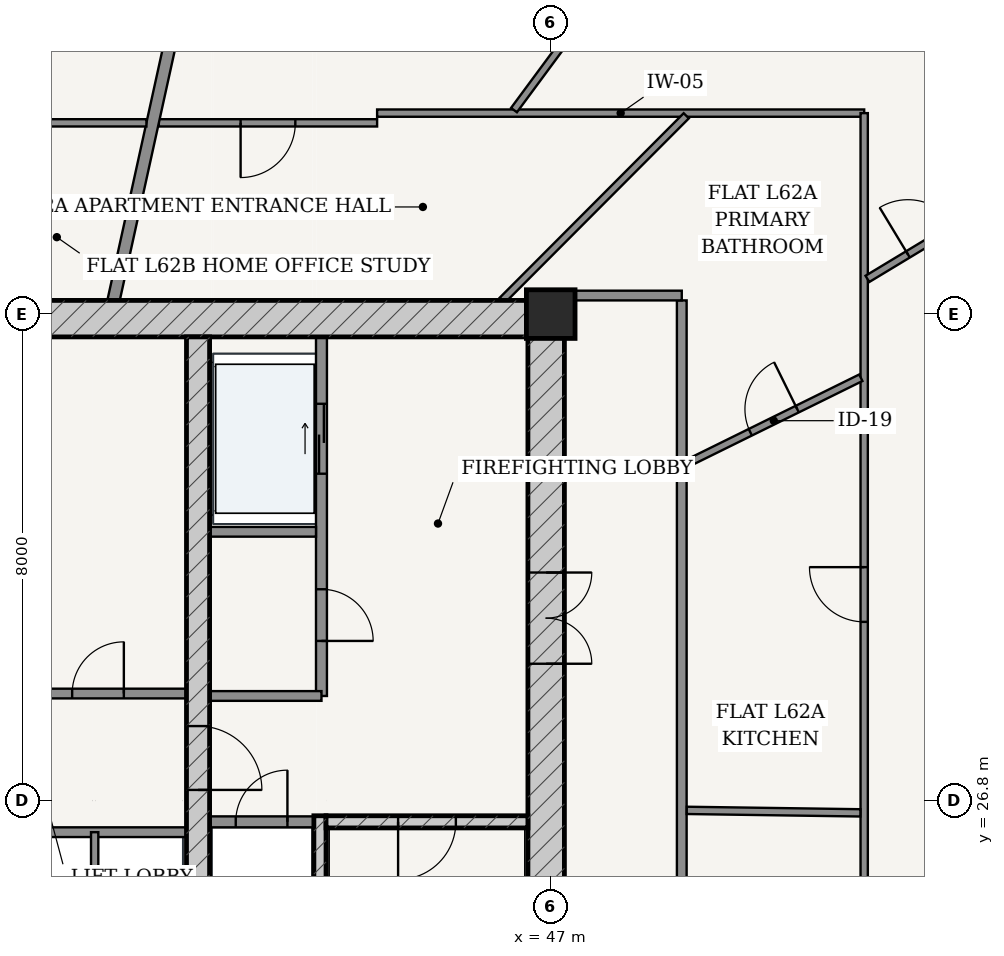
"""IFC4 building model, lengths in metres.
Left out: names, types, materials, properties, quantities, classifications, styles, units other than length and angle.
Written with IfcOpenShell. Run it as: python <this file> out.ifc"""

import sys

from ifc_helpers import new_model, si_unit, direction, frame, frame_2d, origin, origin_2d, place, context, subcontext, project, spatial, rectangle, extrude, source, transform, mapped, element, fill, save


model = new_model("IFC4")
c1 = context("Model", 3, precision=1e-05, world=origin(), true_north=direction((-0.2419218956, 0.970295726276)))
c2 = subcontext(c1, "Body", "Model", "MODEL_VIEW")
j1 = project(units=[si_unit("LENGTHUNIT", "METRE"), si_unit("PLANEANGLEUNIT", "RADIAN")], contexts=[c1])
p1 = place(None, origin())
s1 = spatial("IfcSite", under=j1, at=p1, CompositionType="ELEMENT")
p2 = place(p1, origin())
s2 = spatial("IfcBuilding", under=s1, at=p2, CompositionType="ELEMENT")
p3 = place(p2, frame((0.0, 0.0, 235.6)))
s3 = spatial("IfcBuildingStorey", under=s2, at=p3, CompositionType="ELEMENT", Elevation=235.6)
p4 = place(p3, frame((47.0, 34.8, 0.0), z_axis=(0.0, 0.0, 1.0), x_axis=(1.0, 0.0, 0.0)))
e1 = element("IfcColumn", 1, at=p4, inside=s3, PredefinedType="COLUMN", context=c2, shape_type="SweptSolid", body=[
    extrude(rectangle(XDim=0.8, YDim=0.8, at=origin_2d()), origin(), (0.0, 0.0, 1.0), 3.7),
])
p5 = place(p3, frame((28.775, 34.725, 0.0), z_axis=(0.0, 0.0, 1.0), x_axis=(1.0, 0.0, 0.0)))
e2 = element("IfcWall", 2, at=p5, inside=s3, PredefinedType="SHEAR", context=c2, shape_type="SweptSolid", body=[
    extrude(rectangle(XDim=18.45, YDim=0.6, at=frame_2d((9.225, 0.0))), origin(), (0.0, 0.0, 1.0), 3.435),
])
p6 = place(p3, frame((46.925, 19.175, 0.0), z_axis=(0.0, 0.0, 1.0), x_axis=(0.0, 1.0, 0.0)))
e3 = element("IfcWall", 3, at=p6, inside=s3, PredefinedType="SHEAR", context=c2, shape_type="SweptSolid", body=[
    extrude(rectangle(XDim=15.25, YDim=0.6, at=frame_2d((7.625, 0.0))), origin(), (0.0, 0.0, 1.0), 3.435),
])
p7 = place(p6, frame((9.875, 0.0, 0.0)))
e4 = element("IfcOpeningElement", 4, at=p7, cuts=e3, PredefinedType="OPENING", context=c2, shape_type="SweptSolid", body=[
    extrude(rectangle(XDim=1.5, YDim=2.2, at=frame_2d((0.75, 1.1))), frame((0.0, 0.31, 0.0), z_axis=(0.0, -1.0, 0.0), x_axis=(1.0, 0.0, 0.0)), (0.0, 0.0, 1.0), 0.62),
])
p8 = place(p3, frame((43.205, 19.175, 0.0), z_axis=(0.0, 0.0, 1.0), x_axis=(0.0, 1.0, 0.0)))
e5 = element("IfcWall", 5, at=p8, inside=s3, PredefinedType="SOLIDWALL", context=c2, shape_type="SweptSolid", body=[
    extrude(rectangle(XDim=7.375, YDim=0.2, at=frame_2d((3.688, 0.0))), origin(), (0.0, 0.0, 1.0), 3.435),
])
p9 = place(p3, frame((43.305, 26.45, 0.0), z_axis=(0.0, 0.0, 1.0), x_axis=(1.0, 0.0, 0.0)))
e6 = element("IfcWall", 6, at=p9, inside=s3, PredefinedType="SOLIDWALL", context=c2, shape_type="SweptSolid", body=[
    extrude(rectangle(XDim=3.32, YDim=0.2, at=frame_2d((1.66, 0.0))), origin(), (0.0, 0.0, 1.0), 3.435),
])
p10 = place(p9, frame((1.185, 0.0, 0.0)))
e7 = element("IfcOpeningElement", 7, at=p10, cuts=e6, PredefinedType="OPENING", context=c2, shape_type="SweptSolid", body=[
    extrude(rectangle(XDim=0.95, YDim=2.15, at=frame_2d((0.475, 1.075))), frame((0.0, 0.11, 0.0), z_axis=(0.0, -1.0, 0.0), x_axis=(1.0, 0.0, 0.0)), (0.0, 0.0, 1.0), 0.22),
])
p11 = place(p3, frame((41.2, 19.175, 0.0), z_axis=(0.0, 0.0, 1.0), x_axis=(0.0, 1.0, 0.0)))
e8 = element("IfcWall", 8, at=p11, inside=s3, PredefinedType="SHEAR", context=c2, shape_type="SweptSolid", body=[
    extrude(rectangle(XDim=15.25, YDim=0.38, at=frame_2d((7.625, 0.0))), origin(), (0.0, 0.0, 1.0), 3.435),
])
p12 = place(p11, frame((7.8, 0.0, 0.0)))
e9 = element("IfcOpeningElement", 9, at=p12, cuts=e8, PredefinedType="OPENING", context=c2, shape_type="SweptSolid", body=[
    extrude(rectangle(XDim=1.05, YDim=2.15, at=frame_2d((0.525, 1.075))), frame((0.0, 0.2, 0.0), z_axis=(0.0, -1.0, 0.0), x_axis=(1.0, 0.0, 0.0)), (0.0, 0.0, 1.0), 0.4),
])
p13 = place(p3, frame((41.39, 26.45, 0.0), z_axis=(0.0, 0.0, 1.0), x_axis=(1.0, 0.0, 0.0)))
e10 = element("IfcWall", 10, at=p13, inside=s3, PredefinedType="PARTITIONING", context=c2, shape_type="SweptSolid", body=[
    extrude(rectangle(XDim=1.71, YDim=0.18, at=frame_2d((0.855, 0.0))), origin(), (0.0, 0.0, 1.0), 3.435),
])
p14 = place(p13, frame((0.43, 0.0, 0.0)))
e11 = element("IfcOpeningElement", 11, at=p14, cuts=e10, PredefinedType="OPENING", context=c2, shape_type="SweptSolid", body=[
    extrude(rectangle(XDim=0.85, YDim=2.1, at=frame_2d((0.425, 1.05))), frame((0.0, 0.1, 0.0), z_axis=(0.0, -1.0, 0.0), x_axis=(1.0, 0.0, 0.0)), (0.0, 0.0, 1.0), 0.2),
])
p15 = place(p3, frame((43.23, 28.52, 0.0), z_axis=(0.0, 0.0, 1.0), x_axis=(0.0, 1.0, 0.0)))
e12 = element("IfcWall", 12, at=p15, inside=s3, PredefinedType="PARTITIONING", context=c2, shape_type="SweptSolid", body=[
    extrude(rectangle(XDim=5.905, YDim=0.18, at=frame_2d((2.953, 0.0))), origin(), (0.0, 0.0, 1.0), 3.435),
])
p16 = place(p15, frame((0.905, 0.0, 0.0)))
e13 = element("IfcOpeningElement", 13, at=p16, cuts=e12, PredefinedType="OPENING", context=c2, shape_type="SweptSolid", body=[
    extrude(rectangle(XDim=0.85, YDim=2.1, at=frame_2d((0.425, 1.05))), frame((0.0, 0.1, 0.0), z_axis=(0.0, -1.0, 0.0), x_axis=(1.0, 0.0, 0.0)), (0.0, 0.0, 1.0), 0.2),
])
p17 = place(p15, frame((3.655, 0.0, 0.0)))
e14 = element("IfcOpeningElement", 14, at=p17, cuts=e12, PredefinedType="OPENING", context=c2, shape_type="SweptSolid", body=[
    extrude(rectangle(XDim=1.15, YDim=2.2, at=frame_2d((0.575, 1.1))), frame((0.0, 0.1, 0.0), z_axis=(0.0, -1.0, 0.0), x_axis=(1.0, 0.0, 0.0)), (0.0, 0.0, 1.0), 0.2),
])
p18 = place(p3, frame((41.39, 31.22, 0.0), z_axis=(0.0, 0.0, 1.0), x_axis=(1.0, 0.0, 0.0)))
e15 = element("IfcWall", 15, at=p18, inside=s3, PredefinedType="PARTITIONING", context=c2, shape_type="SweptSolid", body=[
    extrude(rectangle(XDim=1.75, YDim=0.16, at=frame_2d((0.875, 0.0))), origin(), (0.0, 0.0, 1.0), 3.435),
])
p19 = place(p3, frame((41.39, 28.52, 0.0), z_axis=(0.0, 0.0, 1.0), x_axis=(1.0, 0.0, 0.0)))
e16 = element("IfcWall", 16, at=p19, inside=s3, PredefinedType="PARTITIONING", context=c2, shape_type="SweptSolid", body=[
    extrude(rectangle(XDim=1.84, YDim=0.16, at=frame_2d((0.92, 0.0))), origin(), (0.0, 0.0, 1.0), 3.435),
])
p20 = place(p3, frame((34.99, 28.56, 0.0), z_axis=(0.0, 0.0, 1.0), x_axis=(1.0, 0.0, 0.0)))
e17 = element("IfcWall", 17, at=p20, inside=s3, PredefinedType="PARTITIONING", context=c2, shape_type="SweptSolid", body=[
    extrude(rectangle(XDim=6.02, YDim=0.16, at=frame_2d((3.01, 0.0))), origin(), (0.0, 0.0, 1.0), 3.435),
])
p21 = place(p20, frame((1.025, 0.0, 0.0)))
e18 = element("IfcOpeningElement", 18, at=p21, cuts=e17, PredefinedType="OPENING", context=c2, shape_type="SweptSolid", body=[
    extrude(rectangle(XDim=0.86, YDim=2.1, at=frame_2d((0.43, 1.05))), frame((0.0, 0.09, 0.0), z_axis=(0.0, -1.0, 0.0), x_axis=(1.0, 0.0, 0.0)), (0.0, 0.0, 1.0), 0.18),
])
p22 = place(p20, frame((4.14, 0.0, 0.0)))
e19 = element("IfcOpeningElement", 19, at=p22, cuts=e17, PredefinedType="OPENING", context=c2, shape_type="SweptSolid", body=[
    extrude(rectangle(XDim=0.85, YDim=2.1, at=frame_2d((0.425, 1.05))), frame((0.0, 0.09, 0.0), z_axis=(0.0, -1.0, 0.0), x_axis=(1.0, 0.0, 0.0)), (0.0, 0.0, 1.0), 0.18),
])
p23 = place(p3, frame((34.99, 26.28, 0.0), z_axis=(0.0, 0.0, 1.0), x_axis=(1.0, 0.0, 0.0)))
e20 = element("IfcWall", 20, at=p23, inside=s3, PredefinedType="PARTITIONING", context=c2, shape_type="SweptSolid", body=[
    extrude(rectangle(XDim=6.02, YDim=0.16, at=frame_2d((3.01, 0.0))), origin(), (0.0, 0.0, 1.0), 3.435),
])
p24 = place(p23, frame((0.225, 0.0, 0.0)))
e21 = element("IfcOpeningElement", 21, at=p24, cuts=e20, PredefinedType="OPENING", context=c2, shape_type="SweptSolid", body=[
    extrude(rectangle(XDim=1.1, YDim=2.2, at=frame_2d((0.55, 1.1))), frame((0.0, 0.09, 0.0), z_axis=(0.0, -1.0, 0.0), x_axis=(1.0, 0.0, 0.0)), (0.0, 0.0, 1.0), 0.18),
])
p25 = place(p23, frame((1.705, 0.0, 0.0)))
e22 = element("IfcOpeningElement", 22, at=p25, cuts=e20, PredefinedType="OPENING", context=c2, shape_type="SweptSolid", body=[
    extrude(rectangle(XDim=1.1, YDim=2.2, at=frame_2d((0.55, 1.1))), frame((0.0, 0.09, 0.0), z_axis=(0.0, -1.0, 0.0), x_axis=(1.0, 0.0, 0.0)), (0.0, 0.0, 1.0), 0.18),
])
p26 = place(p3, frame((39.5, 23.72, 0.0), z_axis=(0.0, 0.0, 1.0), x_axis=(0.0, 1.0, 0.0)))
e23 = element("IfcWall", 23, at=p26, inside=s3, PredefinedType="PARTITIONING", context=c2, shape_type="SweptSolid", body=[
    extrude(rectangle(XDim=2.56, YDim=0.12, at=frame_2d((1.28, 0.0))), origin(), (0.0, 0.0, 1.0), 3.435),
])
p27 = place(p3, frame((49.155, 16.725, 0.0), z_axis=(0.0, 0.0, 1.0), x_axis=(0.0, 1.0, 0.0)))
e24 = element("IfcWall", 24, at=p27, inside=s3, PredefinedType="PARTITIONING", context=c2, shape_type="SweptSolid", body=[
    extrude(rectangle(XDim=18.3, YDim=0.16, at=frame_2d((9.15, 0.0))), origin(), (0.0, 0.0, 1.0), 2.951),
])
p28 = place(p27, frame((7.401, 0.0, 0.0)))
e25 = element("IfcOpeningElement", 25, at=p28, cuts=e24, PredefinedType="OPENING", context=c2, shape_type="SweptSolid", body=[
    extrude(rectangle(XDim=0.98, YDim=2.2, at=frame_2d((0.49, 1.1))), frame((0.0, 0.09, 0.0), z_axis=(0.0, -1.0, 0.0), x_axis=(1.0, 0.0, 0.0)), (0.0, 0.0, 1.0), 0.18),
])
p29 = place(p3, frame((47.225, 35.105, 0.0), z_axis=(0.0, 0.0, 1.0), x_axis=(1.0, 0.0, 0.0)))
e26 = element("IfcWall", 26, at=p29, inside=s3, PredefinedType="PARTITIONING", context=c2, shape_type="SweptSolid", body=[
    extrude(rectangle(XDim=1.93, YDim=0.16, at=frame_2d((0.965, 0.0))), origin(), (0.0, 0.0, 1.0), 3.435),
])
p30 = place(p3, frame((40.555, 37.945, 0.0), z_axis=(0.0, 0.0, 1.0), x_axis=(1.0, 0.0, 0.0)))
e27 = element("IfcWall", 27, at=p30, inside=s3, PredefinedType="PARTITIONING", context=c2, shape_type="SweptSolid", body=[
    extrude(rectangle(XDim=3.59, YDim=0.12, at=frame_2d((1.795, 0.0))), origin(), (0.0, 0.0, 1.0), 2.951),
])
p31 = place(p30, frame((1.345, 0.0, 0.0)))
e28 = element("IfcOpeningElement", 28, at=p31, cuts=e27, PredefinedType="OPENING", context=c2, shape_type="SweptSolid", body=[
    extrude(rectangle(XDim=0.9, YDim=2.15, at=frame_2d((0.45, 1.075))), frame((0.0, 0.07, 0.0), z_axis=(0.0, -1.0, 0.0), x_axis=(1.0, 0.0, 0.0)), (0.0, 0.0, 1.0), 0.14),
])
p32 = place(p3, frame((44.145, 38.105, 0.0), z_axis=(0.0, 0.0, 1.0), x_axis=(1.0, 0.0, 0.0)))
e29 = element("IfcWall", 29, at=p32, inside=s3, PredefinedType="PARTITIONING", context=c2, shape_type="SweptSolid", body=[
    extrude(rectangle(XDim=8.01, YDim=0.12, at=frame_2d((4.005, 0.0))), origin(), (0.0, 0.0, 1.0), 2.951),
])
p33 = place(p3, frame((52.155, 38.105, 0.0), z_axis=(0.0, 0.0, 1.0), x_axis=(0.0, -1.0, 0.0)))
e30 = element("IfcWall", 30, at=p33, inside=s3, PredefinedType="PARTITIONING", context=c2, shape_type="SweptSolid", body=[
    extrude(rectangle(XDim=16.501, YDim=0.12, at=frame_2d((8.251, 0.0))), origin(), (0.0, 0.0, 1.0), 2.951),
])
p34 = place(p33, frame((13.395, 0.0, 0.0)))
e31 = element("IfcOpeningElement", 31, at=p34, cuts=e30, PredefinedType="OPENING", context=c2, shape_type="SweptSolid", body=[
    extrude(rectangle(XDim=0.9, YDim=2.15, at=frame_2d((0.45, 1.075))), frame((0.0, 0.07, 0.0), z_axis=(0.0, -1.0, 0.0), x_axis=(1.0, 0.0, 0.0)), (0.0, 0.0, 1.0), 0.14),
])
p35 = place(p33, frame((7.467, 0.0, 0.0)))
e32 = element("IfcOpeningElement", 32, at=p35, cuts=e30, PredefinedType="OPENING", context=c2, shape_type="SweptSolid", body=[
    extrude(rectangle(XDim=0.9, YDim=2.15, at=frame_2d((0.45, 1.075))), frame((0.0, 0.07, 0.0), z_axis=(0.0, -1.0, 0.0), x_axis=(1.0, 0.0, 0.0)), (0.0, 0.0, 1.0), 0.14),
])
p36 = place(p3, frame((52.208, 35.379, 0.0), z_axis=(0.0, 0.0, 1.0), x_axis=(0.856039372964, 0.516910622774, 0.0)))
e33 = element("IfcWall", 33, at=p36, inside=s3, PredefinedType="PARTITIONING", context=c2, shape_type="SweptSolid", body=[
    extrude(rectangle(XDim=4.471, YDim=0.12, at=frame_2d((2.236, 0.0))), origin(), (0.0, 0.0, 1.0), 2.951),
])
p37 = place(p36, frame((0.779, 0.0, 0.0)))
e34 = element("IfcOpeningElement", 34, at=p37, cuts=e33, PredefinedType="OPENING", context=c2, shape_type="SweptSolid", body=[
    extrude(rectangle(XDim=0.9, YDim=2.15, at=frame_2d((0.45, 1.075))), frame((0.0, 0.07, 0.0), z_axis=(0.0, -1.0, 0.0), x_axis=(1.0, 0.0, 0.0)), (0.0, 0.0, 1.0), 0.14),
])
p38 = place(p3, frame((46.396, 38.155, 0.0), z_axis=(0.0, 0.0, 1.0), x_axis=(0.594526205526, 0.804076234535, 0.0)))
e35 = element("IfcWall", 35, at=p38, inside=s3, PredefinedType="PARTITIONING", context=c2, shape_type="SweptSolid", body=[
    extrude(rectangle(XDim=6.146, YDim=0.12, at=frame_2d((3.073, 0.0))), origin(), (0.0, 0.0, 1.0), 2.951),
])
p39 = place(p38, frame((1.615, 0.0, 0.0)))
e36 = element("IfcOpeningElement", 36, at=p39, cuts=e35, PredefinedType="OPENING", context=c2, shape_type="SweptSolid", body=[
    extrude(rectangle(XDim=0.9, YDim=2.15, at=frame_2d((0.45, 1.075))), frame((0.0, 0.07, 0.0), z_axis=(0.0, -1.0, 0.0), x_axis=(1.0, 0.0, 0.0)), (0.0, 0.0, 1.0), 0.14),
])
p40 = place(p3, frame((49.237, 26.639, 0.0), z_axis=(0.0, 0.0, 1.0), x_axis=(0.999896890624, -0.014359948506, 0.0)))
e37 = element("IfcWall", 37, at=p40, inside=s3, PredefinedType="PARTITIONING", context=c2, shape_type="SweptSolid", body=[
    extrude(rectangle(XDim=2.856, YDim=0.12, at=frame_2d((1.428, 0.0))), origin(), (0.0, 0.0, 1.0), 3.435),
])
p41 = place(p3, frame((49.237, 32.341, 0.0), z_axis=(0.0, 0.0, 1.0), x_axis=(0.896876689717, 0.442280684004, 0.0)))
e38 = element("IfcWall", 38, at=p41, inside=s3, PredefinedType="PARTITIONING", context=c2, shape_type="SweptSolid", body=[
    extrude(rectangle(XDim=3.192, YDim=0.12, at=frame_2d((1.596, 0.0))), origin(), (0.0, 0.0, 1.0), 3.11),
])
p42 = place(p41, frame((1.166, 0.0, 0.0)))
e39 = element("IfcOpeningElement", 39, at=p42, cuts=e38, PredefinedType="OPENING", context=c2, shape_type="SweptSolid", body=[
    extrude(rectangle(XDim=0.86, YDim=2.15, at=frame_2d((0.43, 1.075))), frame((0.0, 0.07, 0.0), z_axis=(0.0, -1.0, 0.0), x_axis=(1.0, 0.0, 0.0)), (0.0, 0.0, 1.0), 0.14),
])
p43 = place(p3, frame((46.203, 35.026, 0.0), z_axis=(0.0, 0.0, 1.0), x_axis=(0.706080585752, 0.708131489502, 0.0)))
e40 = element("IfcWall", 40, at=p43, inside=s3, PredefinedType="PARTITIONING", context=c2, shape_type="SweptSolid", body=[
    extrude(rectangle(XDim=4.285, YDim=0.12, at=frame_2d((2.143, 0.0))), origin(), (0.0, 0.0, 1.0), 2.951),
])
p44 = place(p3, frame((39.811, 35.027, 0.0), z_axis=(0.0, 0.0, 1.0), x_axis=(0.214966857327, 0.976621344356, 0.0)))
e41 = element("IfcWall", 41, at=p44, inside=s3, PredefinedType="PARTITIONING", context=c2, shape_type="SweptSolid", body=[
    extrude(rectangle(XDim=11.258, YDim=0.2, at=frame_2d((5.629, 0.0))), origin(), (0.0, 0.0, 1.0), 2.52),
])
p45 = place(p3, frame((31.855, 37.945, 0.0), z_axis=(0.0, 0.0, 1.0), x_axis=(1.0, 0.0, 0.0)))
e42 = element("IfcWall", 42, at=p45, inside=s3, PredefinedType="PARTITIONING", context=c2, shape_type="SweptSolid", body=[
    extrude(rectangle(XDim=8.496, YDim=0.12, at=frame_2d((4.248, 0.0))), origin(), (0.0, 0.0, 1.0), 2.951),
])
p46 = place(p45, frame((5.625, 0.0, 0.0)))
e43 = element("IfcOpeningElement", 43, at=p46, cuts=e42, PredefinedType="OPENING", context=c2, shape_type="SweptSolid", body=[
    extrude(rectangle(XDim=0.9, YDim=2.15, at=frame_2d((0.45, 1.075))), frame((0.0, 0.07, 0.0), z_axis=(0.0, -1.0, 0.0), x_axis=(1.0, 0.0, 0.0)), (0.0, 0.0, 1.0), 0.14),
])
m1 = source(origin(), c2, "Body", "SweptSolid", [
    extrude(rectangle(XDim=1.5, YDim=2.2, at=frame_2d((0.75, 1.1))), frame((0.0, 0.025, 0.0), z_axis=(0.0, -1.0, 0.0), x_axis=(1.0, 0.0, 0.0)), (0.0, 0.0, 1.0), 0.05),
])
p47 = place(p7, frame((1.5, 0.0, 0.0), z_axis=(0.0, 0.0, 1.0), x_axis=(-1.0, 0.0, 0.0)))
e44 = element("IfcDoor", 44, at=p47, inside=s3, OperationType="DOUBLE_DOOR_SINGLE_SWING", PredefinedType="DOOR", context=c2, shape_type="MappedRepresentation", body=[
    mapped(m1, transform((0.0, 0.0, 0.0), scale=1.0)),
])
fill(e4, e44)
m2 = source(origin(), c2, "Body", "SweptSolid", [
    extrude(rectangle(XDim=1.05, YDim=2.15, at=frame_2d((0.525, 1.075))), frame((0.0, 0.025, 0.0), z_axis=(0.0, -1.0, 0.0), x_axis=(1.0, 0.0, 0.0)), (0.0, 0.0, 1.0), 0.05),
])
p48 = place(p12, frame((1.05, 0.0, 0.0), z_axis=(0.0, 0.0, 1.0), x_axis=(-1.0, 0.0, 0.0)))
e45 = element("IfcDoor", 45, at=p48, inside=s3, OperationType="SINGLE_SWING_RIGHT", PredefinedType="DOOR", context=c2, shape_type="MappedRepresentation", body=[
    mapped(m2, transform((0.0, 0.0, 0.0), scale=1.0)),
])
fill(e9, e45)
m3 = source(origin(), c2, "Body", "SweptSolid", [
    extrude(rectangle(XDim=0.95, YDim=2.15, at=frame_2d((0.475, 1.075))), frame((0.0, 0.025, 0.0), z_axis=(0.0, -1.0, 0.0), x_axis=(1.0, 0.0, 0.0)), (0.0, 0.0, 1.0), 0.05),
])
p49 = place(p10, frame((0.95, 0.0, 0.0), z_axis=(0.0, 0.0, 1.0), x_axis=(-1.0, 0.0, 0.0)))
e46 = element("IfcDoor", 46, at=p49, inside=s3, OperationType="SINGLE_SWING_RIGHT", PredefinedType="DOOR", context=c2, shape_type="MappedRepresentation", body=[
    mapped(m3, transform((0.0, 0.0, 0.0), scale=1.0)),
])
fill(e7, e46)
m4 = source(origin(), c2, "Body", "SweptSolid", [
    extrude(rectangle(XDim=0.85, YDim=2.1, at=frame_2d((0.425, 1.05))), frame((0.0, 0.025, 0.0), z_axis=(0.0, -1.0, 0.0), x_axis=(1.0, 0.0, 0.0)), (0.0, 0.0, 1.0), 0.05),
])
p50 = place(p14, origin())
e47 = element("IfcDoor", 47, at=p50, inside=s3, OperationType="SINGLE_SWING_RIGHT", PredefinedType="DOOR", context=c2, shape_type="MappedRepresentation", body=[
    mapped(m4, transform((0.0, 0.0, 0.0), scale=1.0)),
])
fill(e11, e47)
p51 = place(p16, frame((0.85, 0.0, 0.0), z_axis=(0.0, 0.0, 1.0), x_axis=(-1.0, 0.0, 0.0)))
e48 = element("IfcDoor", 48, at=p51, inside=s3, OperationType="SINGLE_SWING_RIGHT", PredefinedType="DOOR", context=c2, shape_type="MappedRepresentation", body=[
    mapped(m4, transform((0.0, 0.0, 0.0), scale=1.0)),
])
fill(e13, e48)
p52 = place(p22, origin())
e49 = element("IfcDoor", 49, at=p52, inside=s3, OperationType="SINGLE_SWING_RIGHT", PredefinedType="DOOR", context=c2, shape_type="MappedRepresentation", body=[
    mapped(m4, transform((0.0, 0.0, 0.0), scale=1.0)),
])
fill(e19, e49)
m5 = source(origin(), c2, "Body", "SweptSolid", [
    extrude(rectangle(XDim=1.15, YDim=2.2, at=frame_2d((0.575, 1.1))), frame((0.0, 0.025, 0.0), z_axis=(0.0, -1.0, 0.0), x_axis=(1.0, 0.0, 0.0)), (0.0, 0.0, 1.0), 0.05),
])
p53 = place(p17, origin())
e50 = element("IfcDoor", 50, at=p53, inside=s3, OperationType="DOUBLE_DOOR_SLIDING", PredefinedType="DOOR", context=c2, shape_type="MappedRepresentation", body=[
    mapped(m5, transform((0.0, 0.0, 0.0), scale=1.0)),
])
fill(e14, e50)
m6 = source(origin(), c2, "Body", "SweptSolid", [
    extrude(rectangle(XDim=0.9, YDim=2.15, at=frame_2d((0.45, 1.075))), frame((0.0, 0.025, 0.0), z_axis=(0.0, -1.0, 0.0), x_axis=(1.0, 0.0, 0.0)), (0.0, 0.0, 1.0), 0.05),
])
p54 = place(p35, frame((0.9, 0.0, 0.0), z_axis=(0.0, 0.0, 1.0), x_axis=(-1.0, 0.0, 0.0)))
e51 = element("IfcDoor", 51, at=p54, inside=s3, OperationType="SINGLE_SWING_RIGHT", PredefinedType="DOOR", context=c2, shape_type="MappedRepresentation", body=[
    mapped(m6, transform((0.0, 0.0, 0.0), scale=1.0)),
])
fill(e32, e51)
p55 = place(p37, origin())
e52 = element("IfcDoor", 52, at=p55, inside=s3, OperationType="SINGLE_SWING_LEFT", PredefinedType="DOOR", context=c2, shape_type="MappedRepresentation", body=[
    mapped(m6, transform((0.0, 0.0, 0.0), scale=1.0)),
])
fill(e34, e52)
m7 = source(origin(), c2, "Body", "SweptSolid", [
    extrude(rectangle(XDim=0.86, YDim=2.15, at=frame_2d((0.43, 1.075))), frame((0.0, 0.025, 0.0), z_axis=(0.0, -1.0, 0.0), x_axis=(1.0, 0.0, 0.0)), (0.0, 0.0, 1.0), 0.05),
])
p56 = place(p42, origin())
e53 = element("IfcDoor", 53, at=p56, inside=s3, OperationType="SINGLE_SWING_RIGHT", PredefinedType="DOOR", context=c2, shape_type="MappedRepresentation", body=[
    mapped(m7, transform((0.0, 0.0, 0.0), scale=1.0)),
])
fill(e39, e53)
p57 = place(p31, frame((0.9, 0.0, 0.0), z_axis=(0.0, 0.0, 1.0), x_axis=(-1.0, 0.0, 0.0)))
e54 = element("IfcDoor", 54, at=p57, inside=s3, OperationType="SINGLE_SWING_RIGHT", PredefinedType="DOOR", context=c2, shape_type="MappedRepresentation", body=[
    mapped(m6, transform((0.0, 0.0, 0.0), scale=1.0)),
])
fill(e28, e54)
save(model, sys.argv[1])
